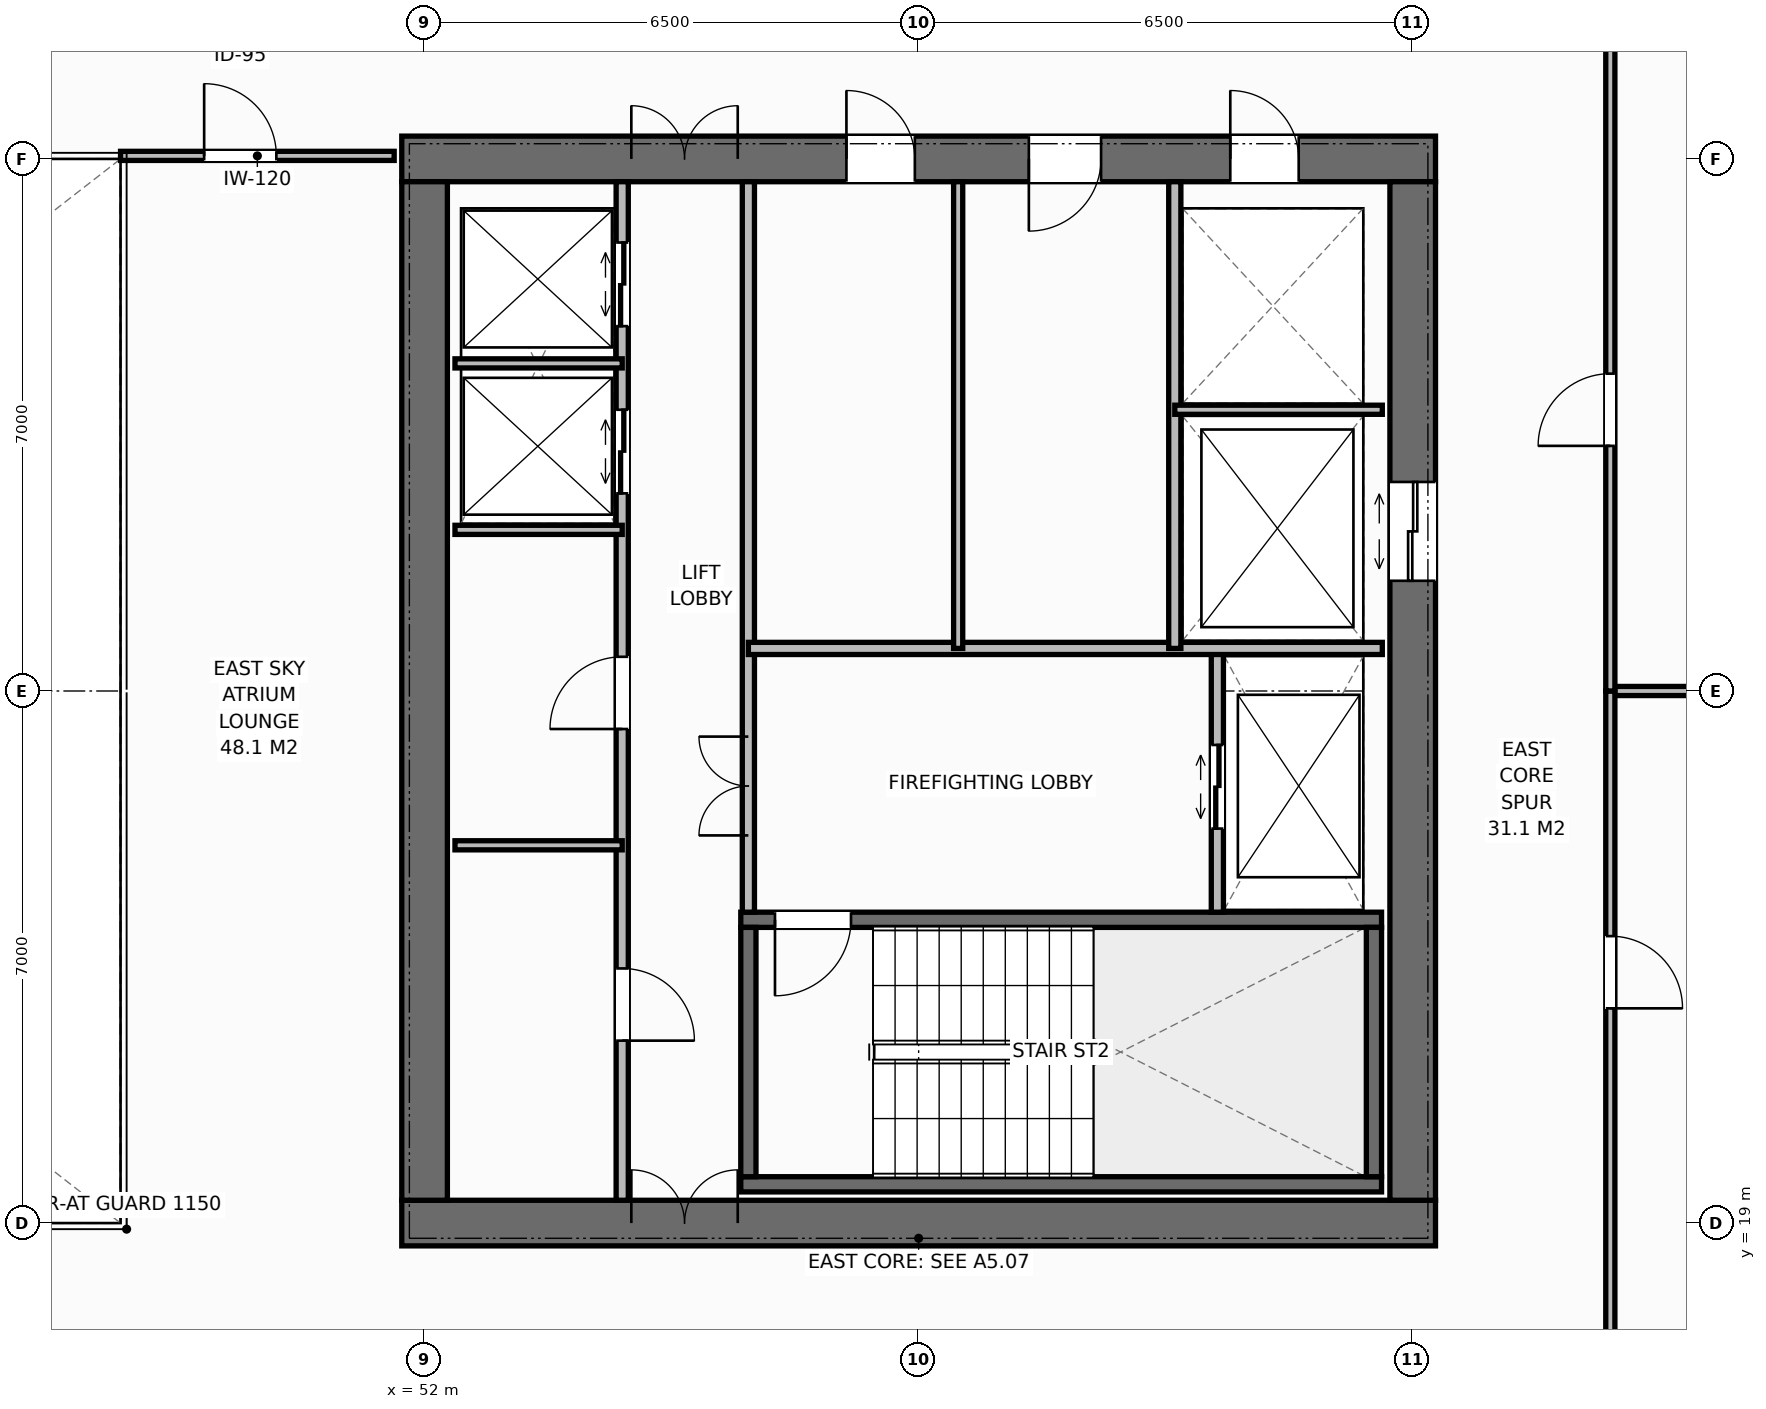
"""IFC4 building model, lengths in metres.
Left out: names, types, materials, properties, quantities, classifications, styles, units other than length and angle.
Written with IfcOpenShell. Run it as: python <this file> out.ifc"""

import sys

from ifc_helpers import new_model, si_unit, direction, frame, frame_2d, origin, place, context, subcontext, project, spatial, rectangle, extrude, element, fill, save


model = new_model("IFC4")
c1 = context("Model", 3, precision=1e-05, world=origin(), true_north=direction((0.0, 1.0)))
c2 = subcontext(c1, "Body", "Model", "MODEL_VIEW")
j1 = project(units=[si_unit("LENGTHUNIT", "METRE"), si_unit("PLANEANGLEUNIT", "RADIAN")], contexts=[c1])
p1 = place(None, origin())
s1 = spatial("IfcSite", under=j1, at=p1, CompositionType="ELEMENT")
p2 = place(p1, origin())
s2 = spatial("IfcBuilding", under=s1, at=p2, CompositionType="ELEMENT")
p3 = place(p2, frame((0.0, 0.0, 167.0)))
s3 = spatial("IfcBuildingStorey", under=s2, at=p3, CompositionType="ELEMENT", Elevation=167.0)
p4 = place(p3, frame((51.7, 19.0, 0.0), z_axis=(0.0, 0.0, 1.0), x_axis=(1.0, 0.0, 0.0)))
e1 = element("IfcWall", 1, at=p4, inside=s3, PredefinedType="SHEAR", context=c2, shape_type="SweptSolid", body=[
    extrude(rectangle(XDim=13.6, YDim=0.6, at=frame_2d((6.8, 0.0))), origin(), (0.0, 0.0, 1.0), 3.8),
])
p5 = place(p4, frame((3.02, 0.0, 0.0)))
e2 = element("IfcOpeningElement", 2, at=p5, cuts=e1, PredefinedType="OPENING", context=c2, shape_type="SweptSolid", body=[
    extrude(rectangle(XDim=1.4, YDim=2.2, at=frame_2d((0.7, 1.1))), frame((0.0, 0.31, 0.0), z_axis=(0.0, -1.0, 0.0), x_axis=(1.0, 0.0, 0.0)), (0.0, 0.0, 1.0), 0.62),
])
p6 = place(p3, frame((51.7, 33.0, 0.0), z_axis=(0.0, 0.0, 1.0), x_axis=(1.0, 0.0, 0.0)))
e3 = element("IfcWall", 3, at=p6, inside=s3, PredefinedType="SHEAR", context=c2, shape_type="SweptSolid", body=[
    extrude(rectangle(XDim=13.6, YDim=0.6, at=frame_2d((6.8, 0.0))), origin(), (0.0, 0.0, 1.0), 3.8),
])
p7 = place(p6, frame((3.02, 0.0, 0.0)))
e4 = element("IfcOpeningElement", 4, at=p7, cuts=e3, PredefinedType="OPENING", context=c2, shape_type="SweptSolid", body=[
    extrude(rectangle(XDim=1.4, YDim=2.2, at=frame_2d((0.7, 1.1))), frame((0.0, 0.31, 0.0), z_axis=(0.0, -1.0, 0.0), x_axis=(1.0, 0.0, 0.0)), (0.0, 0.0, 1.0), 0.62),
])
p8 = place(p6, frame((10.9, 0.0, 0.0)))
e5 = element("IfcOpeningElement", 5, at=p8, cuts=e3, PredefinedType="OPENING", context=c2, shape_type="SweptSolid", body=[
    extrude(rectangle(XDim=0.9, YDim=2.15, at=frame_2d((0.45, 1.075))), frame((0.0, 0.31, 0.0), z_axis=(0.0, -1.0, 0.0), x_axis=(1.0, 0.0, 0.0)), (0.0, 0.0, 1.0), 0.62),
])
p9 = place(p6, frame((5.85, 0.0, 0.0)))
e6 = element("IfcOpeningElement", 6, at=p9, cuts=e3, PredefinedType="OPENING", context=c2, shape_type="SweptSolid", body=[
    extrude(rectangle(XDim=0.9, YDim=2.15, at=frame_2d((0.45, 1.075))), frame((0.0, 0.31, 0.0), z_axis=(0.0, -1.0, 0.0), x_axis=(1.0, 0.0, 0.0)), (0.0, 0.0, 1.0), 0.62),
])
p10 = place(p6, frame((8.25, 0.0, 0.0)))
e7 = element("IfcOpeningElement", 7, at=p10, cuts=e3, PredefinedType="OPENING", context=c2, shape_type="SweptSolid", body=[
    extrude(rectangle(XDim=0.95, YDim=2.15, at=frame_2d((0.475, 1.075))), frame((0.0, 0.31, 0.0), z_axis=(0.0, -1.0, 0.0), x_axis=(1.0, 0.0, 0.0)), (0.0, 0.0, 1.0), 0.62),
])
p11 = place(p3, frame((52.0, 19.3, 0.0), z_axis=(0.0, 0.0, 1.0), x_axis=(0.0, 1.0, 0.0)))
e8 = element("IfcWall", 8, at=p11, inside=s3, PredefinedType="SHEAR", context=c2, shape_type="SweptSolid", body=[
    extrude(rectangle(XDim=13.4, YDim=0.6, at=frame_2d((6.7, 0.0))), origin(), (0.0, 0.0, 1.0), 3.8),
])
p12 = place(p3, frame((65.0, 19.3, 0.0), z_axis=(0.0, 0.0, 1.0), x_axis=(0.0, 1.0, 0.0)))
e9 = element("IfcWall", 9, at=p12, inside=s3, PredefinedType="SHEAR", context=c2, shape_type="SweptSolid", body=[
    extrude(rectangle(XDim=13.4, YDim=0.6, at=frame_2d((6.7, 0.0))), origin(), (0.0, 0.0, 1.0), 3.8),
])
p13 = place(p12, frame((8.15, 0.0, 0.0)))
e10 = element("IfcOpeningElement", 10, at=p13, cuts=e9, PredefinedType="OPENING", context=c2, shape_type="SweptSolid", body=[
    extrude(rectangle(XDim=1.3, YDim=2.2, at=frame_2d((0.65, 1.1))), frame((0.0, 0.31, 0.0), z_axis=(0.0, -1.0, 0.0), x_axis=(1.0, 0.0, 0.0)), (0.0, 0.0, 1.0), 0.62),
])
p14 = place(p3, frame((56.16, 19.51, 0.0), z_axis=(0.0, 0.0, 1.0), x_axis=(1.0, 0.0, 0.0)))
e11 = element("IfcWall", 11, at=p14, inside=s3, PredefinedType="SHEAR", context=c2, shape_type="SweptSolid", body=[
    extrude(rectangle(XDim=8.43, YDim=0.2, at=frame_2d((4.215, 0.0))), origin(), (0.0, 0.0, 1.0), 3.8),
])
p15 = place(p3, frame((56.16, 22.99, 0.0), z_axis=(0.0, 0.0, 1.0), x_axis=(1.0, 0.0, 0.0)))
e12 = element("IfcWall", 12, at=p15, inside=s3, PredefinedType="SHEAR", context=c2, shape_type="SweptSolid", body=[
    extrude(rectangle(XDim=8.43, YDim=0.2, at=frame_2d((4.215, 0.0))), origin(), (0.0, 0.0, 1.0), 3.8),
])
p16 = place(p15, frame((0.45, 0.0, 0.0)))
e13 = element("IfcOpeningElement", 13, at=p16, cuts=e12, PredefinedType="OPENING", context=c2, shape_type="SweptSolid", body=[
    extrude(rectangle(XDim=1.0, YDim=2.15, at=frame_2d((0.5, 1.075))), frame((0.0, 0.11, 0.0), z_axis=(0.0, -1.0, 0.0), x_axis=(1.0, 0.0, 0.0)), (0.0, 0.0, 1.0), 0.22),
])
for number, where, z_axis, x_axis in (
    (14, (56.26, 19.61, 0.0), (0.0, 0.0, 1.0), (0.0, 1.0, 0.0)),
    (15, (64.49, 19.61, 0.0), (0.0, 0.0, 1.0), (0.0, 1.0, 0.0)),
):
    element("IfcWall", number, at=place(p3, frame(where, z_axis=z_axis, x_axis=x_axis)), inside=s3, PredefinedType="SHEAR", context=c2, shape_type="SweptSolid", body=[
        extrude(rectangle(XDim=3.28, YDim=0.2, at=frame_2d((1.64, 0.0))), origin(), (0.0, 0.0, 1.0), 3.8),
    ])
p17 = place(p3, frame((54.6, 19.3, 0.0), z_axis=(0.0, 0.0, 1.0), x_axis=(0.0, 1.0, 0.0)))
e16 = element("IfcWall", 16, at=p17, inside=s3, PredefinedType="STANDARD", context=c2, shape_type="SweptSolid", body=[
    extrude(rectangle(XDim=13.4, YDim=0.16, at=frame_2d((6.7, 0.0))), origin(), (0.0, 0.0, 1.0), 3.572),
])
p18 = place(p17, frame((2.1, 0.0, 0.0)))
e17 = element("IfcOpeningElement", 17, at=p18, cuts=e16, PredefinedType="OPENING", context=c2, shape_type="SweptSolid", body=[
    extrude(rectangle(XDim=0.95, YDim=2.15, at=frame_2d((0.475, 1.075))), frame((0.0, 0.09, 0.0), z_axis=(0.0, -1.0, 0.0), x_axis=(1.0, 0.0, 0.0)), (0.0, 0.0, 1.0), 0.18),
])
p19 = place(p17, frame((6.2, 0.0, 0.0)))
e18 = element("IfcOpeningElement", 18, at=p19, cuts=e16, PredefinedType="OPENING", context=c2, shape_type="SweptSolid", body=[
    extrude(rectangle(XDim=0.95, YDim=2.15, at=frame_2d((0.475, 1.075))), frame((0.0, 0.09, 0.0), z_axis=(0.0, -1.0, 0.0), x_axis=(1.0, 0.0, 0.0)), (0.0, 0.0, 1.0), 0.18),
])
p20 = place(p17, frame((9.3, 0.0, 0.0)))
e19 = element("IfcOpeningElement", 19, at=p20, cuts=e16, PredefinedType="OPENING", context=c2, shape_type="SweptSolid", body=[
    extrude(rectangle(XDim=1.1, YDim=2.2, at=frame_2d((0.55, 1.1))), frame((0.0, 0.09, 0.0), z_axis=(0.0, -1.0, 0.0), x_axis=(1.0, 0.0, 0.0)), (0.0, 0.0, 1.0), 0.18),
])
p21 = place(p17, frame((11.5, 0.0, 0.0)))
e20 = element("IfcOpeningElement", 20, at=p21, cuts=e16, PredefinedType="OPENING", context=c2, shape_type="SweptSolid", body=[
    extrude(rectangle(XDim=1.1, YDim=2.2, at=frame_2d((0.55, 1.1))), frame((0.0, 0.09, 0.0), z_axis=(0.0, -1.0, 0.0), x_axis=(1.0, 0.0, 0.0)), (0.0, 0.0, 1.0), 0.18),
])
p22 = place(p3, frame((56.26, 23.09, 0.0), z_axis=(0.0, 0.0, 1.0), x_axis=(0.0, 1.0, 0.0)))
e21 = element("IfcWall", 21, at=p22, inside=s3, PredefinedType="STANDARD", context=c2, shape_type="SweptSolid", body=[
    extrude(rectangle(XDim=9.61, YDim=0.16, at=frame_2d((4.805, 0.0))), origin(), (0.0, 0.0, 1.0), 3.572),
])
p23 = place(p22, frame((1.01, 0.0, 0.0)))
e22 = element("IfcOpeningElement", 22, at=p23, cuts=e21, PredefinedType="OPENING", context=c2, shape_type="SweptSolid", body=[
    extrude(rectangle(XDim=1.3, YDim=2.2, at=frame_2d((0.65, 1.1))), frame((0.0, 0.09, 0.0), z_axis=(0.0, -1.0, 0.0), x_axis=(1.0, 0.0, 0.0)), (0.0, 0.0, 1.0), 0.18),
])
for number, where, z_axis, x_axis in (
    (23, (52.4, 23.97, 0.0), (0.0, 0.0, 1.0), (1.0, 0.0, 0.0)),
    (24, (52.4, 28.12, 0.0), (0.0, 0.0, 1.0), (1.0, 0.0, 0.0)),
    (25, (52.4, 30.31, 0.0), (0.0, 0.0, 1.0), (1.0, 0.0, 0.0)),
):
    element("IfcWall", number, at=place(p3, frame(where, z_axis=z_axis, x_axis=x_axis)), inside=s3, PredefinedType="PARTITIONING", context=c2, shape_type="SweptSolid", body=[
        extrude(rectangle(XDim=2.2, YDim=0.12, at=frame_2d((1.1, 0.0))), origin(), (0.0, 0.0, 1.0), 3.572),
    ])
p24 = place(p3, frame((62.43, 23.09, 0.0), z_axis=(0.0, 0.0, 1.0), x_axis=(0.0, 1.0, 0.0)))
e26 = element("IfcWall", 26, at=p24, inside=s3, PredefinedType="STANDARD", context=c2, shape_type="SweptSolid", body=[
    extrude(rectangle(XDim=3.47, YDim=0.16, at=frame_2d((1.735, 0.0))), origin(), (0.0, 0.0, 1.0), 3.572),
])
p25 = place(p24, frame((1.1, 0.0, 0.0)))
e27 = element("IfcOpeningElement", 27, at=p25, cuts=e26, PredefinedType="OPENING", context=c2, shape_type="SweptSolid", body=[
    extrude(rectangle(XDim=1.1, YDim=2.2, at=frame_2d((0.55, 1.1))), frame((0.0, 0.09, 0.0), z_axis=(0.0, -1.0, 0.0), x_axis=(1.0, 0.0, 0.0)), (0.0, 0.0, 1.0), 0.18),
])
p26 = place(p3, frame((56.26, 26.56, 0.0), z_axis=(0.0, 0.0, 1.0), x_axis=(1.0, 0.0, 0.0)))
e28 = element("IfcWall", 28, at=p26, inside=s3, PredefinedType="STANDARD", context=c2, shape_type="SweptSolid", body=[
    extrude(rectangle(XDim=8.34, YDim=0.16, at=frame_2d((4.17, 0.0))), origin(), (0.0, 0.0, 1.0), 3.572),
])
p27 = place(p3, frame((61.87, 26.56, 0.0), z_axis=(0.0, 0.0, 1.0), x_axis=(0.0, 1.0, 0.0)))
e29 = element("IfcWall", 29, at=p27, inside=s3, PredefinedType="STANDARD", context=c2, shape_type="SweptSolid", body=[
    extrude(rectangle(XDim=6.14, YDim=0.16, at=frame_2d((3.07, 0.0))), origin(), (0.0, 0.0, 1.0), 3.572),
])
p28 = place(p3, frame((61.87, 29.7, 0.0), z_axis=(0.0, 0.0, 1.0), x_axis=(1.0, 0.0, 0.0)))
e30 = element("IfcWall", 30, at=p28, inside=s3, PredefinedType="PARTITIONING", context=c2, shape_type="SweptSolid", body=[
    extrude(rectangle(XDim=2.73, YDim=0.12, at=frame_2d((1.365, 0.0))), origin(), (0.0, 0.0, 1.0), 3.572),
])
p29 = place(p3, frame((59.02, 26.56, 0.0), z_axis=(0.0, 0.0, 1.0), x_axis=(0.0, 1.0, 0.0)))
e31 = element("IfcWall", 31, at=p29, inside=s3, PredefinedType="PARTITIONING", context=c2, shape_type="SweptSolid", body=[
    extrude(rectangle(XDim=6.14, YDim=0.12, at=frame_2d((3.07, 0.0))), origin(), (0.0, 0.0, 1.0), 3.572),
])
p30 = place(p3, frame((48.0, 33.04, 0.0), z_axis=(0.0, 0.0, 1.0), x_axis=(1.0, 0.0, 0.0)))
e32 = element("IfcWall", 32, at=p30, inside=s3, PredefinedType="PARTITIONING", context=c2, shape_type="SweptSolid", body=[
    extrude(rectangle(XDim=3.6, YDim=0.12, at=frame_2d((1.8, 0.0))), origin(), (0.0, 0.0, 1.0), 3.312),
])
p31 = place(p30, frame((1.1, 0.0, 0.0)))
e33 = element("IfcOpeningElement", 33, at=p31, cuts=e32, PredefinedType="OPENING", context=c2, shape_type="SweptSolid", body=[
    extrude(rectangle(XDim=0.95, YDim=2.15, at=frame_2d((0.475, 1.075))), frame((0.0, 0.07, 0.0), z_axis=(0.0, -1.0, 0.0), x_axis=(1.0, 0.0, 0.0)), (0.0, 0.0, 1.0), 0.14),
])
p32 = place(p3, frame((67.6, 26.0, 0.0), z_axis=(0.0, 0.0, 1.0), x_axis=(1.0, 0.0, 0.0)))
e34 = element("IfcWall", 34, at=p32, inside=s3, PredefinedType="PARTITIONING", context=c2, shape_type="SweptSolid", body=[
    extrude(rectangle(XDim=6.58, YDim=0.12, at=frame_2d((3.29, 0.0))), origin(), (0.0, 0.0, 1.0), 3.572),
])
p33 = place(p3, frame((67.6, 16.5, 0.0), z_axis=(0.0, 0.0, 1.0), x_axis=(0.0, 1.0, 0.0)))
e35 = element("IfcWall", 35, at=p33, inside=s3, PredefinedType="PARTITIONING", context=c2, shape_type="SweptSolid", body=[
    extrude(rectangle(XDim=9.5, YDim=0.12, at=frame_2d((4.75, 0.0))), origin(), (0.0, 0.0, 1.0), 3.572),
])
p34 = place(p33, frame((5.325, 0.0, 0.0)))
e36 = element("IfcOpeningElement", 36, at=p34, cuts=e35, PredefinedType="OPENING", context=c2, shape_type="SweptSolid", body=[
    extrude(rectangle(XDim=0.95, YDim=2.15, at=frame_2d((0.475, 1.075))), frame((0.0, 0.07, 0.0), z_axis=(0.0, -1.0, 0.0), x_axis=(1.0, 0.0, 0.0)), (0.0, 0.0, 1.0), 0.14),
])
p35 = place(p3, frame((67.6, 26.0, 0.0), z_axis=(0.0, 0.0, 1.0), x_axis=(0.0, 1.0, 0.0)))
e37 = element("IfcWall", 37, at=p35, inside=s3, PredefinedType="PARTITIONING", context=c2, shape_type="SweptSolid", body=[
    extrude(rectangle(XDim=9.5, YDim=0.12, at=frame_2d((4.75, 0.0))), origin(), (0.0, 0.0, 1.0), 3.572),
])
p36 = place(p35, frame((3.225, 0.0, 0.0)))
e38 = element("IfcOpeningElement", 38, at=p36, cuts=e37, PredefinedType="OPENING", context=c2, shape_type="SweptSolid", body=[
    extrude(rectangle(XDim=0.95, YDim=2.15, at=frame_2d((0.475, 1.075))), frame((0.0, 0.07, 0.0), z_axis=(0.0, -1.0, 0.0), x_axis=(1.0, 0.0, 0.0)), (0.0, 0.0, 1.0), 0.14),
])
p37 = place(p5, origin())
e39 = element("IfcDoor", 39, at=p37, inside=s3, OperationType="DOUBLE_DOOR_SINGLE_SWING", PredefinedType="DOOR", context=c2, shape_type="SweptSolid", body=[
    extrude(rectangle(XDim=1.4, YDim=2.2, at=frame_2d((0.7, 1.1))), frame((0.0, 0.075, 0.0), z_axis=(0.0, -1.0, 0.0), x_axis=(1.0, 0.0, 0.0)), (0.0, 0.0, 1.0), 0.05),
])
fill(e2, e39)
p38 = place(p7, origin())
e40 = element("IfcDoor", 40, at=p38, inside=s3, OperationType="DOUBLE_DOOR_SINGLE_SWING", PredefinedType="DOOR", context=c2, shape_type="SweptSolid", body=[
    extrude(rectangle(XDim=1.4, YDim=2.2, at=frame_2d((0.7, 1.1))), frame((0.0, -0.025, 0.0), z_axis=(0.0, -1.0, 0.0), x_axis=(1.0, 0.0, 0.0)), (0.0, 0.0, 1.0), 0.05),
])
fill(e4, e40)
p39 = place(p18, origin())
e41 = element("IfcDoor", 41, at=p39, inside=s3, OperationType="SINGLE_SWING_RIGHT", PredefinedType="DOOR", context=c2, shape_type="SweptSolid", body=[
    extrude(rectangle(XDim=0.95, YDim=2.15, at=frame_2d((0.475, 1.075))), frame((0.0, 0.025, 0.0), z_axis=(0.0, -1.0, 0.0), x_axis=(1.0, 0.0, 0.0)), (0.0, 0.0, 1.0), 0.05),
])
fill(e17, e41)
p40 = place(p19, origin())
e42 = element("IfcDoor", 42, at=p40, inside=s3, OperationType="SINGLE_SWING_LEFT", PredefinedType="DOOR", context=c2, shape_type="SweptSolid", body=[
    extrude(rectangle(XDim=0.95, YDim=2.15, at=frame_2d((0.475, 1.075))), frame((0.0, 0.025, 0.0), z_axis=(0.0, -1.0, 0.0), x_axis=(1.0, 0.0, 0.0)), (0.0, 0.0, 1.0), 0.05),
])
fill(e18, e42)
p41 = place(p20, origin())
e43 = element("IfcDoor", 43, at=p41, inside=s3, OperationType="DOUBLE_DOOR_SLIDING", PredefinedType="DOOR", context=c2, shape_type="SweptSolid", body=[
    extrude(rectangle(XDim=1.1, YDim=2.2, at=frame_2d((0.55, 1.1))), frame((0.0, 0.025, 0.0), z_axis=(0.0, -1.0, 0.0), x_axis=(1.0, 0.0, 0.0)), (0.0, 0.0, 1.0), 0.05),
])
fill(e19, e43)
p42 = place(p21, origin())
e44 = element("IfcDoor", 44, at=p42, inside=s3, OperationType="DOUBLE_DOOR_SLIDING", PredefinedType="DOOR", context=c2, shape_type="SweptSolid", body=[
    extrude(rectangle(XDim=1.1, YDim=2.2, at=frame_2d((0.55, 1.1))), frame((0.0, 0.025, 0.0), z_axis=(0.0, -1.0, 0.0), x_axis=(1.0, 0.0, 0.0)), (0.0, 0.0, 1.0), 0.05),
])
fill(e20, e44)
p43 = place(p16, origin())
e45 = element("IfcDoor", 45, at=p43, inside=s3, OperationType="SINGLE_SWING_RIGHT", PredefinedType="DOOR", context=c2, shape_type="SweptSolid", body=[
    extrude(rectangle(XDim=1.0, YDim=2.15, at=frame_2d((0.5, 1.075))), frame((0.0, 0.025, 0.0), z_axis=(0.0, -1.0, 0.0), x_axis=(1.0, 0.0, 0.0)), (0.0, 0.0, 1.0), 0.05),
])
fill(e13, e45)
p44 = place(p25, origin())
e46 = element("IfcDoor", 46, at=p44, inside=s3, OperationType="DOUBLE_DOOR_SLIDING", PredefinedType="DOOR", context=c2, shape_type="SweptSolid", body=[
    extrude(rectangle(XDim=1.1, YDim=2.2, at=frame_2d((0.55, 1.1))), frame((0.0, 0.025, 0.0), z_axis=(0.0, -1.0, 0.0), x_axis=(1.0, 0.0, 0.0)), (0.0, 0.0, 1.0), 0.05),
])
fill(e27, e46)
p45 = place(p23, origin())
e47 = element("IfcDoor", 47, at=p45, inside=s3, OperationType="DOUBLE_DOOR_SINGLE_SWING", PredefinedType="DOOR", context=c2, shape_type="SweptSolid", body=[
    extrude(rectangle(XDim=1.3, YDim=2.2, at=frame_2d((0.65, 1.1))), frame((0.0, 0.025, 0.0), z_axis=(0.0, -1.0, 0.0), x_axis=(1.0, 0.0, 0.0)), (0.0, 0.0, 1.0), 0.05),
])
fill(e22, e47)
p46 = place(p13, origin())
e48 = element("IfcDoor", 48, at=p46, inside=s3, OperationType="DOUBLE_DOOR_SLIDING", PredefinedType="DOOR", context=c2, shape_type="SweptSolid", body=[
    extrude(rectangle(XDim=1.3, YDim=2.2, at=frame_2d((0.65, 1.1))), frame((0.0, 0.025, 0.0), z_axis=(0.0, -1.0, 0.0), x_axis=(1.0, 0.0, 0.0)), (0.0, 0.0, 1.0), 0.05),
])
fill(e10, e48)
p47 = place(p8, origin())
e49 = element("IfcDoor", 49, at=p47, inside=s3, OperationType="SINGLE_SWING_LEFT", PredefinedType="DOOR", context=c2, shape_type="SweptSolid", body=[
    extrude(rectangle(XDim=0.9, YDim=2.15, at=frame_2d((0.45, 1.075))), frame((0.0, -0.025, 0.0), z_axis=(0.0, -1.0, 0.0), x_axis=(1.0, 0.0, 0.0)), (0.0, 0.0, 1.0), 0.05),
])
fill(e5, e49)
p48 = place(p9, origin())
e50 = element("IfcDoor", 50, at=p48, inside=s3, OperationType="SINGLE_SWING_LEFT", PredefinedType="DOOR", context=c2, shape_type="SweptSolid", body=[
    extrude(rectangle(XDim=0.9, YDim=2.15, at=frame_2d((0.45, 1.075))), frame((0.0, -0.025, 0.0), z_axis=(0.0, -1.0, 0.0), x_axis=(1.0, 0.0, 0.0)), (0.0, 0.0, 1.0), 0.05),
])
fill(e6, e50)
p49 = place(p10, origin())
e51 = element("IfcDoor", 51, at=p49, inside=s3, OperationType="SINGLE_SWING_RIGHT", PredefinedType="DOOR", context=c2, shape_type="SweptSolid", body=[
    extrude(rectangle(XDim=0.95, YDim=2.15, at=frame_2d((0.475, 1.075))), frame((0.0, -0.025, 0.0), z_axis=(0.0, -1.0, 0.0), x_axis=(1.0, 0.0, 0.0)), (0.0, 0.0, 1.0), 0.05),
])
fill(e7, e51)
p50 = place(p31, origin())
e52 = element("IfcDoor", 52, at=p50, inside=s3, OperationType="SINGLE_SWING_LEFT", PredefinedType="DOOR", context=c2, shape_type="SweptSolid", body=[
    extrude(rectangle(XDim=0.95, YDim=2.15, at=frame_2d((0.475, 1.075))), frame((0.0, 0.025, 0.0), z_axis=(0.0, -1.0, 0.0), x_axis=(1.0, 0.0, 0.0)), (0.0, 0.0, 1.0), 0.05),
])
fill(e33, e52)
p51 = place(p34, origin())
e53 = element("IfcDoor", 53, at=p51, inside=s3, OperationType="SINGLE_SWING_RIGHT", PredefinedType="DOOR", context=c2, shape_type="SweptSolid", body=[
    extrude(rectangle(XDim=0.95, YDim=2.15, at=frame_2d((0.475, 1.075))), frame((0.0, 0.025, 0.0), z_axis=(0.0, -1.0, 0.0), x_axis=(1.0, 0.0, 0.0)), (0.0, 0.0, 1.0), 0.05),
])
fill(e36, e53)
p52 = place(p36, origin())
e54 = element("IfcDoor", 54, at=p52, inside=s3, OperationType="SINGLE_SWING_LEFT", PredefinedType="DOOR", context=c2, shape_type="SweptSolid", body=[
    extrude(rectangle(XDim=0.95, YDim=2.15, at=frame_2d((0.475, 1.075))), frame((0.0, 0.025, 0.0), z_axis=(0.0, -1.0, 0.0), x_axis=(1.0, 0.0, 0.0)), (0.0, 0.0, 1.0), 0.05),
])
fill(e38, e54)
save(model, sys.argv[1])
